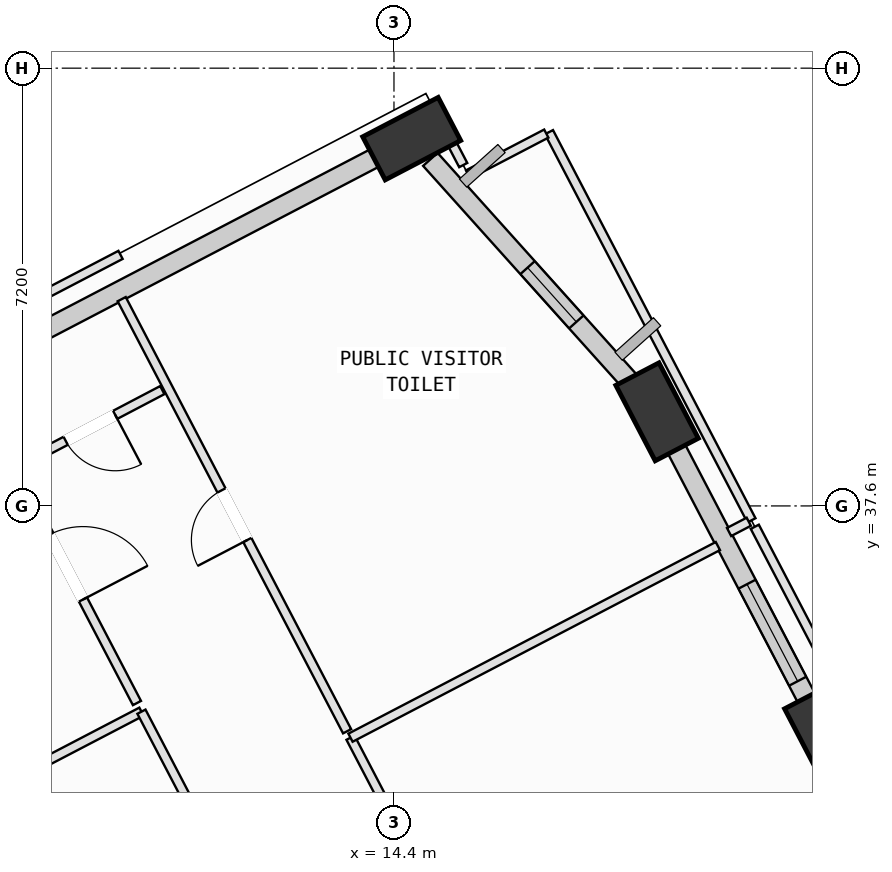
"""IFC4 building model, lengths in metres.
Left out: names, types, materials, properties, quantities, classifications, styles, units other than length and angle.
Written with IfcOpenShell. Run it as: python <this file> out.ifc"""

import sys

from ifc_helpers import new_model, si_unit, direction, frame, frame_2d, origin, origin_2d, place, context, subcontext, project, spatial, rectangle, extrude, element, fill, save


model = new_model("IFC4")
c1 = context("Model", 3, precision=1e-05, world=origin(), true_north=direction((0.0, 1.0)))
c2 = subcontext(c1, "Body", "Model", "MODEL_VIEW")
j1 = project(units=[si_unit("LENGTHUNIT", "METRE"), si_unit("PLANEANGLEUNIT", "RADIAN")], contexts=[c1])
p1 = place(None, origin())
s1 = spatial("IfcSite", under=j1, at=p1, CompositionType="ELEMENT")
p2 = place(p1, origin())
s2 = spatial("IfcBuilding", under=s1, at=p2, CompositionType="ELEMENT")
p3 = place(p2, frame((0.0, 0.0, 140.4)))
s3 = spatial("IfcBuildingStorey", under=s2, at=p3, CompositionType="ELEMENT", Elevation=140.4)
p4 = place(p3, frame((21.502, 33.828, 0.002), z_axis=(-0.036932649589, -0.050396391412, 0.998046182863), x_axis=(0.149987895413, 0.987134715444, 0.055395710969)))
e1 = element("IfcColumn", 1, at=p4, inside=s3, PredefinedType="COLUMN", context=c2, shape_type="SweptSolid", body=[
    extrude(rectangle(XDim=1.4, YDim=0.8, at=origin_2d()), origin(), (0.0, 0.0, 1.0), 3.953),
])
p5 = place(p3, frame((18.727, 39.148, 0.002), z_axis=(-0.058783551583, -0.061942625482, 0.996347130879), x_axis=(0.272586926496, 0.959147545124, 0.075712311991)))
e2 = element("IfcColumn", 2, at=p5, inside=s3, PredefinedType="COLUMN", context=c2, shape_type="SweptSolid", body=[
    extrude(rectangle(XDim=1.4, YDim=0.8, at=origin_2d()), origin(), (0.0, 0.0, 1.0), 3.941),
])
p6 = place(p3, frame((14.691, 43.641, 0.002), z_axis=(-0.076984912261, -0.078532036704, 0.993934626872), x_axis=(0.954951007688, -0.292371934535, 0.050864769855)))
e3 = element("IfcColumn", 3, at=p6, inside=s3, PredefinedType="COLUMN", context=c2, shape_type="SweptSolid", body=[
    extrude(rectangle(XDim=1.4, YDim=0.8, at=origin_2d()), origin(), (0.0, 0.0, 1.0), 3.945),
])
p7 = place(p3, frame((18.97, 38.683, 0.0), z_axis=(0.0, 0.0, 1.0), x_axis=(0.462529637731, -0.886603820328, 0.0)))
e4 = element("IfcWall", 4, at=p7, inside=s3, PredefinedType="SOLIDWALL", context=c2, shape_type="SweptSolid", body=[
    extrude(rectangle(XDim=5.047, YDim=0.32, at=frame_2d((2.523, 0.0))), origin(), (0.0, 0.0, 1.0), 3.085),
])
p8 = place(p7, frame((2.673, 0.0, 0.75)))
e5 = element("IfcOpeningElement", 5, at=p8, cuts=e4, PredefinedType="OPENING", context=c2, shape_type="SweptSolid", body=[
    extrude(rectangle(XDim=1.8, YDim=2.05, at=frame_2d((0.9, 1.025))), frame((0.0, 0.17, 0.0), z_axis=(0.0, -1.0, 0.0), x_axis=(1.0, 0.0, 0.0)), (0.0, 0.0, 1.0), 0.34),
])
p9 = place(p3, frame((14.998, 43.3, 0.0), z_axis=(0.0, 0.0, 1.0), x_axis=(0.66822271705, -0.743961289596, 0.0)))
e6 = element("IfcWall", 6, at=p9, inside=s3, PredefinedType="SOLIDWALL", context=c2, shape_type="SweptSolid", body=[
    extrude(rectangle(XDim=5.128, YDim=0.32, at=frame_2d((2.564, 0.0))), origin(), (0.0, 0.0, 1.0), 3.085),
])
p10 = place(p9, frame((2.393, 0.0, 0.75)))
e7 = element("IfcOpeningElement", 7, at=p10, cuts=e6, PredefinedType="OPENING", context=c2, shape_type="SweptSolid", body=[
    extrude(rectangle(XDim=1.2, YDim=1.75, at=frame_2d((0.6, 0.875))), frame((0.0, 0.17, 0.0), z_axis=(0.0, -1.0, 0.0), x_axis=(1.0, 0.0, 0.0)), (0.0, 0.0, 1.0), 0.34),
])
p11 = place(p3, frame((7.658, 39.972, 0.0), z_axis=(0.0, 0.0, 1.0), x_axis=(0.886603508344, 0.462530235759, 0.0)))
e8 = element("IfcWall", 8, at=p11, inside=s3, PredefinedType="SOLIDWALL", context=c2, shape_type="SweptSolid", body=[
    extrude(rectangle(XDim=7.231, YDim=0.32, at=frame_2d((3.615, 0.0))), origin(), (0.0, 0.0, 1.0), 3.085),
])
p12 = place(p3, frame((0.525, 29.145, 0.0), z_axis=(0.0, 0.0, 1.0), x_axis=(0.886636847368, 0.462466324059, 0.0)))
e9 = element("IfcWall", 9, at=p12, inside=s3, PredefinedType="PARTITIONING", context=c2, shape_type="SweptSolid", body=[
    extrude(rectangle(XDim=10.965, YDim=0.15, at=frame_2d((5.483, 0.0))), origin(), (0.0, 0.0, 1.0), 3.7),
])
p13 = place(p3, frame((10.247, 34.216, 0.0), z_axis=(0.0, 0.0, 1.0), x_axis=(0.462514680435, -0.886611623194, 0.0)))
e10 = element("IfcWall", 10, at=p13, inside=s3, PredefinedType="PARTITIONING", context=c2, shape_type="SweptSolid", body=[
    extrude(rectangle(XDim=5.04, YDim=0.15, at=frame_2d((2.52, 0.0))), origin(), (0.0, 0.0, 1.0), 3.7),
])
p14 = place(p13, frame((1.92, 0.0, 0.0)))
e11 = element("IfcOpeningElement", 11, at=p14, cuts=e10, PredefinedType="OPENING", context=c2, shape_type="SweptSolid", body=[
    extrude(rectangle(XDim=1.2, YDim=2.15, at=frame_2d((0.6, 1.075))), frame((0.0, 0.085, 0.0), z_axis=(0.0, -1.0, 0.0), x_axis=(1.0, 0.0, 0.0)), (0.0, 0.0, 1.0), 0.17),
])
p15 = place(p3, frame((7.842, 38.827, 0.0), z_axis=(0.0, 0.0, 1.0), x_axis=(0.462473305165, -0.886633206016, 0.0)))
e12 = element("IfcWall", 12, at=p15, inside=s3, PredefinedType="PARTITIONING", context=c2, shape_type="SweptSolid", body=[
    extrude(rectangle(XDim=5.041, YDim=0.15, at=frame_2d((2.52, 0.0))), origin(), (0.0, 0.0, 1.0), 2.885),
])
p16 = place(p15, frame((1.92, 0.0, 0.0)))
e13 = element("IfcOpeningElement", 13, at=p16, cuts=e12, PredefinedType="OPENING", context=c2, shape_type="SweptSolid", body=[
    extrude(rectangle(XDim=1.2, YDim=2.15, at=frame_2d((0.6, 1.075))), frame((0.0, 0.085, 0.0), z_axis=(0.0, -1.0, 0.0), x_axis=(1.0, 0.0, 0.0)), (0.0, 0.0, 1.0), 0.17),
])
p17 = place(p3, frame((17.542, 26.394, 0.0), z_axis=(0.0, 0.0, 1.0), x_axis=(-0.46248796698, 0.886625558169, 0.0)))
e14 = element("IfcWall", 14, at=p17, inside=s3, PredefinedType="PARTITIONING", context=c2, shape_type="SweptSolid", body=[
    extrude(rectangle(XDim=8.34, YDim=0.15, at=frame_2d((4.17, 0.0))), origin(), (0.0, 0.0, 1.0), 3.7),
])
p18 = place(p17, frame((3.71, 0.0, 0.0)))
e15 = element("IfcOpeningElement", 15, at=p18, cuts=e14, PredefinedType="OPENING", context=c2, shape_type="SweptSolid", body=[
    extrude(rectangle(XDim=0.92, YDim=2.1, at=frame_2d((0.46, 1.05))), frame((0.0, 0.085, 0.0), z_axis=(0.0, -1.0, 0.0), x_axis=(1.0, 0.0, 0.0)), (0.0, 0.0, 1.0), 0.17),
])
p19 = place(p3, frame((13.685, 33.788, 0.0), z_axis=(0.0, 0.0, 1.0), x_axis=(0.886614228897, 0.462509685431, 0.0)))
e16 = element("IfcWall", 16, at=p19, inside=s3, PredefinedType="PARTITIONING", context=c2, shape_type="SweptSolid", body=[
    extrude(rectangle(XDim=6.815, YDim=0.15, at=frame_2d((3.407, 0.0))), origin(), (0.0, 0.0, 1.0), 3.7),
])
p20 = place(p3, frame((20.334, 37.257, 0.0), z_axis=(0.0, 0.0, 1.0), x_axis=(0.462531995197, -0.886602590465, 0.0)))
e17 = element("IfcWall", 17, at=p20, inside=s3, PredefinedType="PARTITIONING", context=c2, shape_type="SweptSolid", body=[
    extrude(rectangle(XDim=8.341, YDim=0.15, at=frame_2d((4.17, 0.0))), origin(), (0.0, 0.0, 1.0), 3.7),
])
p21 = place(p3, frame((16.949, 43.747, 0.0), z_axis=(0.0, 0.0, 1.0), x_axis=(0.462487208348, -0.886625953892, 0.0)))
e18 = element("IfcWall", 18, at=p21, inside=s3, PredefinedType="PARTITIONING", context=c2, shape_type="SweptSolid", body=[
    extrude(rectangle(XDim=7.2, YDim=0.15, at=frame_2d((3.6, 0.0))), origin(), (0.0, 0.0, 1.0), 3.7),
])
p22 = place(p3, frame((20.235, 37.34, 0.0), z_axis=(0.0, 0.0, 1.0), x_axis=(-0.886549133333, -0.462634449849, 0.0)))
e19 = element("IfcWall", 19, at=p22, inside=s3, PredefinedType="PARTITIONING", context=c2, shape_type="SweptSolid", body=[
    extrude(rectangle(XDim=0.366, YDim=0.15, at=frame_2d((0.183, 0.0))), origin(), (0.0, 0.0, 1.0), 3.7),
])
p23 = place(p3, frame((13.629, 33.894, 0.0), z_axis=(0.0, 0.0, 1.0), x_axis=(-0.462450459837, 0.886645121904, 0.0)))
e20 = element("IfcWall", 20, at=p23, inside=s3, PredefinedType="PARTITIONING", context=c2, shape_type="SweptSolid", body=[
    extrude(rectangle(XDim=8.016, YDim=0.15, at=frame_2d((4.008, 0.0))), origin(), (0.0, 0.0, 1.0), 3.7),
])
p24 = place(p23, frame((3.548, 0.0, 0.0)))
e21 = element("IfcOpeningElement", 21, at=p24, cuts=e20, PredefinedType="OPENING", context=c2, shape_type="SweptSolid", body=[
    extrude(rectangle(XDim=0.92, YDim=2.1, at=frame_2d((0.46, 1.05))), frame((0.0, 0.085, 0.0), z_axis=(0.0, -1.0, 0.0), x_axis=(1.0, 0.0, 0.0)), (0.0, 0.0, 1.0), 0.17),
])
p25 = place(p3, frame((13.981, 43.485, 0.0), z_axis=(0.0, 0.0, 1.0), x_axis=(0.886692611484, 0.462359397807, 0.0)))
e22 = element("IfcWall", 22, at=p25, inside=s3, PredefinedType="PARTITIONING", context=c2, shape_type="SweptSolid", body=[
    extrude(rectangle(XDim=1.252, YDim=0.15, at=frame_2d((0.626, 0.0))), origin(), (0.0, 0.0, 1.0), 3.085),
])
p26 = place(p3, frame((15.114, 44.02, 0.0), z_axis=(0.0, 0.0, 1.0), x_axis=(0.462883996774, -0.886418865735, 0.0)))
e23 = element("IfcWall", 23, at=p26, inside=s3, PredefinedType="PARTITIONING", context=c2, shape_type="SweptSolid", body=[
    extrude(rectangle(XDim=0.918, YDim=0.15, at=frame_2d((0.459, 0.0))), origin(), (0.0, 0.0, 1.0), 3.7),
])
p27 = place(p3, frame((15.619, 43.053, 0.0), z_axis=(0.0, 0.0, 1.0), x_axis=(0.886551836058, 0.462629270563, 0.0)))
e24 = element("IfcWall", 24, at=p27, inside=s3, PredefinedType="PARTITIONING", context=c2, shape_type="SweptSolid", body=[
    extrude(rectangle(XDim=1.451, YDim=0.15, at=frame_2d((0.725, 0.0))), origin(), (0.0, 0.0, 1.0), 3.7),
])
p28 = place(p3, frame((4.415, 38.866, 0.0), z_axis=(0.0, 0.0, 1.0), x_axis=(0.886603833565, 0.462529612359, 0.0)))
e25 = element("IfcWall", 25, at=p28, inside=s3, PredefinedType="PARTITIONING", context=c2, shape_type="SweptSolid", body=[
    extrude(rectangle(XDim=6.19, YDim=0.15, at=frame_2d((3.095, 0.0))), origin(), (0.0, 0.0, 1.0), 3.7),
])
p29 = place(p3, frame((10.59, 39.505, 0.0), z_axis=(0.0, 0.0, 1.0), x_axis=(-0.885419541183, -0.464792680764, 0.0)))
e26 = element("IfcWall", 26, at=p29, inside=s3, PredefinedType="PARTITIONING", context=c2, shape_type="SweptSolid", body=[
    extrude(rectangle(XDim=2.67, YDim=0.15, at=frame_2d((1.335, 0.0))), origin(), (0.0, 0.0, 1.0), 3.7),
])
p30 = place(p29, frame((0.875, 0.0, 0.0)))
e27 = element("IfcOpeningElement", 27, at=p30, cuts=e26, PredefinedType="OPENING", context=c2, shape_type="SweptSolid", body=[
    extrude(rectangle(XDim=0.92, YDim=2.1, at=frame_2d((0.46, 1.05))), frame((0.0, 0.085, 0.0), z_axis=(0.0, -1.0, 0.0), x_axis=(1.0, 0.0, 0.0)), (0.0, 0.0, 1.0), 0.17),
])
p31 = place(p8, origin())
e28 = element("IfcWindow", 28, at=p31, inside=s3, PartitioningType="SINGLE_PANEL", PredefinedType="WINDOW", context=c2, shape_type="SweptSolid", body=[
    extrude(rectangle(XDim=1.8, YDim=2.05, at=frame_2d((0.9, 1.025))), frame((0.0, 0.03, 0.0), z_axis=(0.0, -1.0, 0.0), x_axis=(1.0, 0.0, 0.0)), (0.0, 0.0, 1.0), 0.06),
])
fill(e5, e28)
p32 = place(p10, origin())
e29 = element("IfcWindow", 29, at=p32, inside=s3, PartitioningType="SINGLE_PANEL", PredefinedType="WINDOW", context=c2, shape_type="SweptSolid", body=[
    extrude(rectangle(XDim=1.2, YDim=1.75, at=frame_2d((0.6, 0.875))), frame((0.0, 0.03, 0.0), z_axis=(0.0, -1.0, 0.0), x_axis=(1.0, 0.0, 0.0)), (0.0, 0.0, 1.0), 0.06),
])
fill(e7, e29)
p33 = place(p16, origin())
e30 = element("IfcDoor", 30, at=p33, inside=s3, OperationType="SINGLE_SWING_RIGHT", PredefinedType="DOOR", context=c2, shape_type="SweptSolid", body=[
    extrude(rectangle(XDim=1.2, YDim=2.15, at=frame_2d((0.6, 1.075))), frame((0.0, 0.025, 0.0), z_axis=(0.0, -1.0, 0.0), x_axis=(1.0, 0.0, 0.0)), (0.0, 0.0, 1.0), 0.05),
])
fill(e13, e30)
p34 = place(p24, origin())
e31 = element("IfcDoor", 31, at=p34, inside=s3, OperationType="SINGLE_SWING_LEFT", PredefinedType="DOOR", context=c2, shape_type="SweptSolid", body=[
    extrude(rectangle(XDim=0.92, YDim=2.1, at=frame_2d((0.46, 1.05))), frame((0.0, 0.025, 0.0), z_axis=(0.0, -1.0, 0.0), x_axis=(1.0, 0.0, 0.0)), (0.0, 0.0, 1.0), 0.05),
])
fill(e21, e31)
p35 = place(p30, origin())
e32 = element("IfcDoor", 32, at=p35, inside=s3, OperationType="SINGLE_SWING_LEFT", PredefinedType="DOOR", context=c2, shape_type="SweptSolid", body=[
    extrude(rectangle(XDim=0.92, YDim=2.1, at=frame_2d((0.46, 1.05))), frame((0.0, 0.025, 0.0), z_axis=(0.0, -1.0, 0.0), x_axis=(1.0, 0.0, 0.0)), (0.0, 0.0, 1.0), 0.05),
])
fill(e27, e32)
save(model, sys.argv[1])
